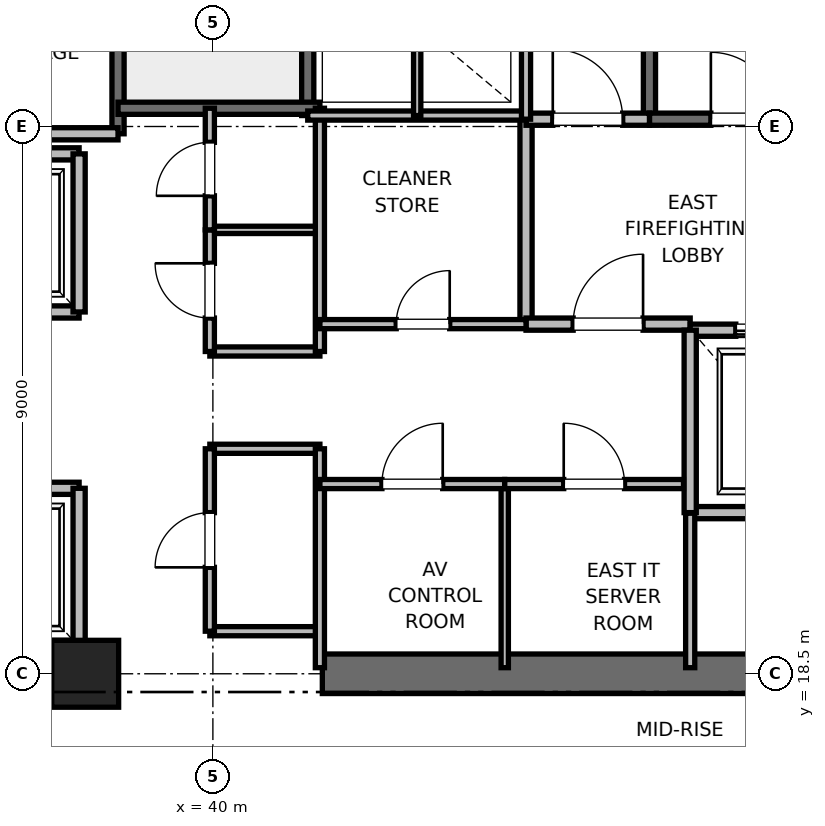
"""IFC4 building model, lengths in metres.
Left out: names, types, materials, properties, quantities, classifications, styles, units other than length and angle.
Written with IfcOpenShell. Run it as: python <this file> out.ifc"""

import sys

from ifc_helpers import new_model, si_unit, direction, frame, frame_2d, origin, origin_2d, place, context, subcontext, project, spatial, rectangle, extrude, element, fill, save


model = new_model("IFC4")
c1 = context("Model", 3, precision=1e-05, world=origin(), true_north=direction((0.0, 1.0)))
c2 = subcontext(c1, "Body", "Model", "MODEL_VIEW")
j1 = project(units=[si_unit("LENGTHUNIT", "METRE"), si_unit("PLANEANGLEUNIT", "RADIAN")], contexts=[c1])
p1 = place(None, origin())
s1 = spatial("IfcSite", under=j1, at=p1, CompositionType="ELEMENT")
p2 = place(p1, origin())
s2 = spatial("IfcBuilding", under=s1, at=p2, CompositionType="ELEMENT")
p3 = place(p2, frame((0.0, 0.0, 71.6)))
s3 = spatial("IfcBuildingStorey", under=s2, at=p3, CompositionType="ELEMENT", Elevation=71.6)
p4 = place(p3, frame((37.9, 18.5, 0.0), z_axis=(0.0, 0.0, 1.0), x_axis=(1.0, 0.0, 0.0)))
e1 = element("IfcColumn", 1, at=p4, inside=s3, PredefinedType="PILASTER", context=c2, shape_type="SweptSolid", body=[
    extrude(rectangle(XDim=1.1, YDim=1.1, at=origin_2d()), origin(), (0.0, 0.0, 1.0), 4.0),
])
for number, where, z_axis, x_axis in (
    (2, (29.0, 18.5, 0.0), (0.0, 0.0, 1.0), (1.0, 0.0, 0.0)),
    (3, (41.8, 18.5, 0.0), (0.0, 0.0, 1.0), (1.0, 0.0, 0.0)),
):
    element("IfcWall", number, at=place(p3, frame(where, z_axis=z_axis, x_axis=x_axis)), inside=s3, PredefinedType="SHEAR", context=c2, shape_type="SweptSolid", body=[
        extrude(rectangle(XDim=9.2, YDim=0.65, at=frame_2d((4.6, 0.0))), origin(), (0.0, 0.0, 1.0), 3.76),
    ])
p5 = place(p3, frame((47.18, 27.62, 0.0), z_axis=(0.0, 0.0, 1.0), x_axis=(0.0, 1.0, 0.0)))
e4 = element("IfcWall", 4, at=p5, inside=s3, PredefinedType="SOLIDWALL", context=c2, shape_type="SweptSolid", body=[
    extrude(rectangle(XDim=8.18, YDim=0.2, at=frame_2d((4.09, 0.0))), origin(), (0.0, 0.0, 1.0), 3.76),
])
p6 = place(p3, frame((47.18, 27.62, 0.0), z_axis=(0.0, 0.0, 1.0), x_axis=(1.0, 0.0, 0.0)))
e5 = element("IfcWall", 5, at=p6, inside=s3, PredefinedType="SOLIDWALL", context=c2, shape_type="SweptSolid", body=[
    extrude(rectangle(XDim=3.12, YDim=0.2, at=frame_2d((1.56, 0.0))), origin(), (0.0, 0.0, 1.0), 3.76),
])
p7 = place(p6, frame((1.01, 0.0, 0.0)))
e6 = element("IfcOpeningElement", 6, at=p7, cuts=e5, PredefinedType="OPENING", context=c2, shape_type="SweptSolid", body=[
    extrude(rectangle(XDim=1.1, YDim=2.15, at=frame_2d((0.55, 1.075))), frame((0.0, 0.1, 0.0), z_axis=(0.0, -1.0, 0.0), x_axis=(1.0, 0.0, 0.0)), (0.0, 0.0, 1.0), 0.2),
])
p8 = place(p3, frame((38.44, 27.38, 0.0), z_axis=(0.0, 0.0, 1.0), x_axis=(0.0, 1.0, 0.0)))
e7 = element("IfcWall", 7, at=p8, inside=s3, PredefinedType="SOLIDWALL", context=c2, shape_type="SweptSolid", body=[
    extrude(rectangle(XDim=8.87, YDim=0.2, at=frame_2d((4.435, 0.0))), origin(), (0.0, 0.0, 1.0), 3.76),
])
p9 = place(p3, frame((41.56, 27.68, 0.0), z_axis=(0.0, 0.0, 1.0), x_axis=(0.0, 1.0, 0.0)))
e8 = element("IfcWall", 8, at=p9, inside=s3, PredefinedType="SOLIDWALL", context=c2, shape_type="SweptSolid", body=[
    extrude(rectangle(XDim=8.57, YDim=0.2, at=frame_2d((4.285, 0.0))), origin(), (0.0, 0.0, 1.0), 3.76),
])
p10 = place(p3, frame((38.44, 27.8, 0.0), z_axis=(0.0, 0.0, 1.0), x_axis=(1.0, 0.0, 0.0)))
e9 = element("IfcWall", 9, at=p10, inside=s3, PredefinedType="SOLIDWALL", context=c2, shape_type="SweptSolid", body=[
    extrude(rectangle(XDim=3.32, YDim=0.2, at=frame_2d((1.66, 0.0))), origin(), (0.0, 0.0, 1.0), 3.76),
])
p11 = place(p3, frame((32.82, 27.38, 0.0), z_axis=(0.0, 0.0, 1.0), x_axis=(1.0, 0.0, 0.0)))
e10 = element("IfcWall", 10, at=p11, inside=s3, PredefinedType="PARTITIONING", context=c2, shape_type="SweptSolid", body=[
    extrude(rectangle(XDim=5.62, YDim=0.2, at=frame_2d((2.81, 0.0))), origin(), (0.0, 0.0, 1.0), 3.76),
])
p12 = place(p3, frame((45.15, 24.25, 0.0), z_axis=(0.0, 0.0, 1.0), x_axis=(0.0, 1.0, 0.0)))
e11 = element("IfcWall", 11, at=p12, inside=s3, PredefinedType="PARTITIONING", context=c2, shape_type="SweptSolid", body=[
    extrude(rectangle(XDim=3.37, YDim=0.2, at=frame_2d((1.685, 0.0))), origin(), (0.0, 0.0, 1.0), 3.76),
])
p13 = place(p3, frame((45.15, 24.25, 0.0), z_axis=(0.0, 0.0, 1.0), x_axis=(1.0, 0.0, 0.0)))
e12 = element("IfcWall", 12, at=p13, inside=s3, PredefinedType="PARTITIONING", context=c2, shape_type="SweptSolid", body=[
    extrude(rectangle(XDim=2.7, YDim=0.2, at=frame_2d((1.35, 0.0))), origin(), (0.0, 0.0, 1.0), 3.76),
])
p14 = place(p13, frame((0.775, 0.0, 0.0)))
e13 = element("IfcOpeningElement", 13, at=p14, cuts=e12, PredefinedType="OPENING", context=c2, shape_type="SweptSolid", body=[
    extrude(rectangle(XDim=1.15, YDim=2.2, at=frame_2d((0.575, 1.1))), frame((0.0, 0.1, 0.0), z_axis=(0.0, -1.0, 0.0), x_axis=(1.0, 0.0, 0.0)), (0.0, 0.0, 1.0), 0.2),
])
p15 = place(p3, frame((45.15, 27.62, 0.0), z_axis=(0.0, 0.0, 1.0), x_axis=(1.0, 0.0, 0.0)))
e14 = element("IfcWall", 14, at=p15, inside=s3, PredefinedType="PARTITIONING", context=c2, shape_type="SweptSolid", body=[
    extrude(rectangle(XDim=2.03, YDim=0.2, at=frame_2d((1.015, 0.0))), origin(), (0.0, 0.0, 1.0), 3.76),
])
p16 = place(p15, frame((0.44, 0.0, 0.0)))
e15 = element("IfcOpeningElement", 15, at=p16, cuts=e14, PredefinedType="OPENING", context=c2, shape_type="SweptSolid", body=[
    extrude(rectangle(XDim=1.15, YDim=2.2, at=frame_2d((0.575, 1.1))), frame((0.0, 0.1, 0.0), z_axis=(0.0, -1.0, 0.0), x_axis=(1.0, 0.0, 0.0)), (0.0, 0.0, 1.0), 0.2),
])
p17 = place(p3, frame((47.85, 21.15, 0.0), z_axis=(0.0, 0.0, 1.0), x_axis=(1.0, 0.0, 0.0)))
e16 = element("IfcWall", 16, at=p17, inside=s3, PredefinedType="SOLIDWALL", context=c2, shape_type="SweptSolid", body=[
    extrude(rectangle(XDim=2.6, YDim=0.2, at=frame_2d((1.3, 0.0))), origin(), (0.0, 0.0, 1.0), 3.76),
])
p18 = place(p3, frame((50.45, 24.15, 0.0), z_axis=(0.0, 0.0, 1.0), x_axis=(-1.0, 0.0, 0.0)))
e17 = element("IfcWall", 17, at=p18, inside=s3, PredefinedType="SOLIDWALL", context=c2, shape_type="SweptSolid", body=[
    extrude(rectangle(XDim=2.6, YDim=0.2, at=frame_2d((1.3, 0.0))), origin(), (0.0, 0.0, 1.0), 2.54),
])
p19 = place(p18, frame((0.75, 0.0, 0.0)))
e18 = element("IfcOpeningElement", 18, at=p19, cuts=e17, PredefinedType="OPENING", context=c2, shape_type="SweptSolid", body=[
    extrude(rectangle(XDim=1.1, YDim=2.2, at=frame_2d((0.55, 1.1))), frame((0.0, 0.1, 0.0), z_axis=(0.0, -1.0, 0.0), x_axis=(1.0, 0.0, 0.0)), (0.0, 0.0, 1.0), 0.2),
])
p20 = place(p3, frame((47.85, 24.15, 0.0), z_axis=(0.0, 0.0, 1.0), x_axis=(0.0, -1.0, 0.0)))
e19 = element("IfcWall", 19, at=p20, inside=s3, PredefinedType="SOLIDWALL", context=c2, shape_type="SweptSolid", body=[
    extrude(rectangle(XDim=3.0, YDim=0.2, at=frame_2d((1.5, 0.0))), origin(), (0.0, 0.0, 1.0), 3.76),
])
p21 = place(p3, frame((35.5, 18.95, 0.0), z_axis=(0.0, 0.0, 1.0), x_axis=(1.0, 0.0, 0.0)))
e20 = element("IfcWall", 20, at=p21, inside=s3, PredefinedType="SOLIDWALL", context=c2, shape_type="SweptSolid", body=[
    extrude(rectangle(XDim=2.3, YDim=0.2, at=frame_2d((1.15, 0.0))), origin(), (0.0, 0.0, 1.0), 2.54),
])
p22 = place(p3, frame((37.8, 21.55, 0.0), z_axis=(0.0, 0.0, 1.0), x_axis=(-1.0, 0.0, 0.0)))
e21 = element("IfcWall", 21, at=p22, inside=s3, PredefinedType="SOLIDWALL", context=c2, shape_type="SweptSolid", body=[
    extrude(rectangle(XDim=2.3, YDim=0.2, at=frame_2d((1.15, 0.0))), origin(), (0.0, 0.0, 1.0), 3.76),
])
p23 = place(p22, frame((0.6, 0.0, 0.0)))
e22 = element("IfcOpeningElement", 22, at=p23, cuts=e21, PredefinedType="OPENING", context=c2, shape_type="SweptSolid", body=[
    extrude(rectangle(XDim=1.1, YDim=2.2, at=frame_2d((0.55, 1.1))), frame((0.0, 0.1, 0.0), z_axis=(0.0, -1.0, 0.0), x_axis=(1.0, 0.0, 0.0)), (0.0, 0.0, 1.0), 0.2),
])
p24 = place(p3, frame((37.8, 18.95, 0.0), z_axis=(0.0, 0.0, 1.0), x_axis=(0.0, 1.0, 0.0)))
e23 = element("IfcWall", 23, at=p24, inside=s3, PredefinedType="SOLIDWALL", context=c2, shape_type="SweptSolid", body=[
    extrude(rectangle(XDim=2.6, YDim=0.2, at=frame_2d((1.3, 0.0))), origin(), (0.0, 0.0, 1.0), 2.54),
])
p25 = place(p3, frame((35.5, 24.45, 0.0), z_axis=(0.0, 0.0, 1.0), x_axis=(1.0, 0.0, 0.0)))
e24 = element("IfcWall", 24, at=p25, inside=s3, PredefinedType="SOLIDWALL", context=c2, shape_type="SweptSolid", body=[
    extrude(rectangle(XDim=2.3, YDim=0.2, at=frame_2d((1.15, 0.0))), origin(), (0.0, 0.0, 1.0), 3.76),
])
p26 = place(p25, frame((0.6, 0.0, 0.0)))
e25 = element("IfcOpeningElement", 25, at=p26, cuts=e24, PredefinedType="OPENING", context=c2, shape_type="SweptSolid", body=[
    extrude(rectangle(XDim=1.1, YDim=2.2, at=frame_2d((0.55, 1.1))), frame((0.0, 0.1, 0.0), z_axis=(0.0, -1.0, 0.0), x_axis=(1.0, 0.0, 0.0)), (0.0, 0.0, 1.0), 0.2),
])
p27 = place(p3, frame((37.8, 27.05, 0.0), z_axis=(0.0, 0.0, 1.0), x_axis=(-1.0, 0.0, 0.0)))
e26 = element("IfcWall", 26, at=p27, inside=s3, PredefinedType="SOLIDWALL", context=c2, shape_type="SweptSolid", body=[
    extrude(rectangle(XDim=2.3, YDim=0.2, at=frame_2d((1.15, 0.0))), origin(), (0.0, 0.0, 1.0), 3.76),
])
p28 = place(p3, frame((37.8, 24.45, 0.0), z_axis=(0.0, 0.0, 1.0), x_axis=(0.0, 1.0, 0.0)))
e27 = element("IfcWall", 27, at=p28, inside=s3, PredefinedType="SOLIDWALL", context=c2, shape_type="SweptSolid", body=[
    extrude(rectangle(XDim=2.6, YDim=0.2, at=frame_2d((1.3, 0.0))), origin(), (0.0, 0.0, 1.0), 3.76),
])
for number, where, z_axis, x_axis in (
    (28, (39.95, 19.2, 0.0), (0.0, 0.0, 1.0), (1.0, 0.0, 0.0)),
    (29, (39.95, 22.2, 0.0), (0.0, 0.0, 1.0), (1.0, 0.0, 0.0)),
    (30, (39.95, 23.8, 0.0), (0.0, 0.0, 1.0), (1.0, 0.0, 0.0)),
):
    element("IfcWall", number, at=place(p3, frame(where, z_axis=z_axis, x_axis=x_axis)), inside=s3, PredefinedType="PARTITIONING", context=c2, shape_type="SweptSolid", body=[
        extrude(rectangle(XDim=1.81, YDim=0.15, at=frame_2d((0.905, 0.0))), origin(), (0.0, 0.0, 1.0), 2.85),
    ])
p29 = place(p3, frame((39.95, 25.8, 0.0), z_axis=(0.0, 0.0, 1.0), x_axis=(1.0, 0.0, 0.0)))
e31 = element("IfcWall", 31, at=p29, inside=s3, PredefinedType="PARTITIONING", context=c2, shape_type="SweptSolid", body=[
    extrude(rectangle(XDim=1.81, YDim=0.12, at=frame_2d((0.905, 0.0))), origin(), (0.0, 0.0, 1.0), 2.85),
])
p30 = place(p3, frame((41.76, 18.6, 0.0), z_axis=(0.0, 0.0, 1.0), x_axis=(0.0, 1.0, 0.0)))
e32 = element("IfcWall", 32, at=p30, inside=s3, PredefinedType="PARTITIONING", context=c2, shape_type="SweptSolid", body=[
    extrude(rectangle(XDim=3.6, YDim=0.15, at=frame_2d((1.8, 0.0))), origin(), (0.0, 0.0, 1.0), 2.54),
])
p31 = place(p3, frame((41.76, 23.8, 0.0), z_axis=(0.0, 0.0, 1.0), x_axis=(0.0, 1.0, 0.0)))
e33 = element("IfcWall", 33, at=p31, inside=s3, PredefinedType="PARTITIONING", context=c2, shape_type="SweptSolid", body=[
    extrude(rectangle(XDim=4.0, YDim=0.15, at=frame_2d((2.0, 0.0))), origin(), (0.0, 0.0, 1.0), 2.85),
])
p32 = place(p3, frame((39.95, 19.2, 0.0), z_axis=(0.0, 0.0, 1.0), x_axis=(0.0, 1.0, 0.0)))
e34 = element("IfcWall", 34, at=p32, inside=s3, PredefinedType="PARTITIONING", context=c2, shape_type="SweptSolid", body=[
    extrude(rectangle(XDim=3.0, YDim=0.15, at=frame_2d((1.5, 0.0))), origin(), (0.0, 0.0, 1.0), 2.85),
])
p33 = place(p32, frame((1.05, 0.0, 0.0)))
e35 = element("IfcOpeningElement", 35, at=p33, cuts=e34, PredefinedType="OPENING", context=c2, shape_type="SweptSolid", body=[
    extrude(rectangle(XDim=0.9, YDim=2.1, at=frame_2d((0.45, 1.05))), frame((0.0, 0.075, 0.0), z_axis=(0.0, -1.0, 0.0), x_axis=(1.0, 0.0, 0.0)), (0.0, 0.0, 1.0), 0.15),
])
p34 = place(p3, frame((39.95, 23.8, 0.0), z_axis=(0.0, 0.0, 1.0), x_axis=(0.0, 1.0, 0.0)))
e36 = element("IfcWall", 36, at=p34, inside=s3, PredefinedType="PARTITIONING", context=c2, shape_type="SweptSolid", body=[
    extrude(rectangle(XDim=2.0, YDim=0.15, at=frame_2d((1.0, 0.0))), origin(), (0.0, 0.0, 1.0), 2.85),
])
p35 = place(p34, frame((0.55, 0.0, 0.0)))
e37 = element("IfcOpeningElement", 37, at=p35, cuts=e36, PredefinedType="OPENING", context=c2, shape_type="SweptSolid", body=[
    extrude(rectangle(XDim=0.9, YDim=2.1, at=frame_2d((0.45, 1.05))), frame((0.0, 0.075, 0.0), z_axis=(0.0, -1.0, 0.0), x_axis=(1.0, 0.0, 0.0)), (0.0, 0.0, 1.0), 0.15),
])
p36 = place(p3, frame((39.95, 25.8, 0.0), z_axis=(0.0, 0.0, 1.0), x_axis=(0.0, 1.0, 0.0)))
e38 = element("IfcWall", 38, at=p36, inside=s3, PredefinedType="PARTITIONING", context=c2, shape_type="SweptSolid", body=[
    extrude(rectangle(XDim=2.0, YDim=0.15, at=frame_2d((1.0, 0.0))), origin(), (0.0, 0.0, 1.0), 2.85),
])
p37 = place(p36, frame((0.56, 0.0, 0.0)))
e39 = element("IfcOpeningElement", 39, at=p37, cuts=e38, PredefinedType="OPENING", context=c2, shape_type="SweptSolid", body=[
    extrude(rectangle(XDim=0.88, YDim=2.1, at=frame_2d((0.44, 1.05))), frame((0.0, 0.075, 0.0), z_axis=(0.0, -1.0, 0.0), x_axis=(1.0, 0.0, 0.0)), (0.0, 0.0, 1.0), 0.15),
])
p38 = place(p3, frame((41.56, 27.68, 0.0), z_axis=(0.0, 0.0, 1.0), x_axis=(1.0, 0.0, 0.0)))
e40 = element("IfcWall", 40, at=p38, inside=s3, PredefinedType="PARTITIONING", context=c2, shape_type="SweptSolid", body=[
    extrude(rectangle(XDim=3.59, YDim=0.15, at=frame_2d((1.795, 0.0))), origin(), (0.0, 0.0, 1.0), 2.85),
])
p39 = place(p3, frame((47.85, 18.6, 0.0), z_axis=(0.0, 0.0, 1.0), x_axis=(0.0, 1.0, 0.0)))
e41 = element("IfcWall", 41, at=p39, inside=s3, PredefinedType="PARTITIONING", context=c2, shape_type="SweptSolid", body=[
    extrude(rectangle(XDim=2.54, YDim=0.15, at=frame_2d((1.27, 0.0))), origin(), (0.0, 0.0, 1.0), 2.85),
])
p40 = place(p3, frame((44.8, 18.6, 0.0), z_axis=(0.0, 0.0, 1.0), x_axis=(0.0, 1.0, 0.0)))
e42 = element("IfcWall", 42, at=p40, inside=s3, PredefinedType="PARTITIONING", context=c2, shape_type="SweptSolid", body=[
    extrude(rectangle(XDim=3.02, YDim=0.12, at=frame_2d((1.51, 0.0))), origin(), (0.0, 0.0, 1.0), 2.85),
])
p41 = place(p3, frame((41.76, 21.62, 0.0), z_axis=(0.0, 0.0, 1.0), x_axis=(1.0, 0.0, 0.0)))
e43 = element("IfcWall", 43, at=p41, inside=s3, PredefinedType="PARTITIONING", context=c2, shape_type="SweptSolid", body=[
    extrude(rectangle(XDim=3.04, YDim=0.15, at=frame_2d((1.52, 0.0))), origin(), (0.0, 0.0, 1.0), 2.85),
])
p42 = place(p41, frame((1.02, 0.0, 0.0)))
e44 = element("IfcOpeningElement", 44, at=p42, cuts=e43, PredefinedType="OPENING", context=c2, shape_type="SweptSolid", body=[
    extrude(rectangle(XDim=1.0, YDim=2.15, at=frame_2d((0.5, 1.075))), frame((0.0, 0.075, 0.0), z_axis=(0.0, -1.0, 0.0), x_axis=(1.0, 0.0, 0.0)), (0.0, 0.0, 1.0), 0.15),
])
p43 = place(p3, frame((44.8, 21.62, 0.0), z_axis=(0.0, 0.0, 1.0), x_axis=(1.0, 0.0, 0.0)))
e45 = element("IfcWall", 45, at=p43, inside=s3, PredefinedType="PARTITIONING", context=c2, shape_type="SweptSolid", body=[
    extrude(rectangle(XDim=2.94, YDim=0.15, at=frame_2d((1.47, 0.0))), origin(), (0.0, 0.0, 1.0), 2.85),
])
p44 = place(p43, frame((0.97, 0.0, 0.0)))
e46 = element("IfcOpeningElement", 46, at=p44, cuts=e45, PredefinedType="OPENING", context=c2, shape_type="SweptSolid", body=[
    extrude(rectangle(XDim=1.0, YDim=2.15, at=frame_2d((0.5, 1.075))), frame((0.0, 0.075, 0.0), z_axis=(0.0, -1.0, 0.0), x_axis=(1.0, 0.0, 0.0)), (0.0, 0.0, 1.0), 0.15),
])
p45 = place(p3, frame((41.76, 24.25, 0.0), z_axis=(0.0, 0.0, 1.0), x_axis=(1.0, 0.0, 0.0)))
e47 = element("IfcWall", 47, at=p45, inside=s3, PredefinedType="PARTITIONING", context=c2, shape_type="SweptSolid", body=[
    extrude(rectangle(XDim=3.39, YDim=0.15, at=frame_2d((1.695, 0.0))), origin(), (0.0, 0.0, 1.0), 2.85),
])
p46 = place(p45, frame((1.255, 0.0, 0.0)))
e48 = element("IfcOpeningElement", 48, at=p46, cuts=e47, PredefinedType="OPENING", context=c2, shape_type="SweptSolid", body=[
    extrude(rectangle(XDim=0.88, YDim=2.1, at=frame_2d((0.44, 1.05))), frame((0.0, 0.075, 0.0), z_axis=(0.0, -1.0, 0.0), x_axis=(1.0, 0.0, 0.0)), (0.0, 0.0, 1.0), 0.15),
])
p47 = place(p3, frame((45.15, 27.62, 0.0), z_axis=(0.0, 0.0, 1.0), x_axis=(0.0, 1.0, 0.0)))
e49 = element("IfcWall", 49, at=p47, inside=s3, PredefinedType="PARTITIONING", context=c2, shape_type="SweptSolid", body=[
    extrude(rectangle(XDim=3.1, YDim=0.15, at=frame_2d((1.55, 0.0))), origin(), (0.0, 0.0, 1.0), 2.85),
])
p48 = place(p3, frame((43.36, 27.68, 0.0), z_axis=(0.0, 0.0, 1.0), x_axis=(0.0, 1.0, 0.0)))
e50 = element("IfcWall", 50, at=p48, inside=s3, PredefinedType="PARTITIONING", context=c2, shape_type="SweptSolid", body=[
    extrude(rectangle(XDim=3.04, YDim=0.12, at=frame_2d((1.52, 0.0))), origin(), (0.0, 0.0, 1.0), 2.85),
])
p49 = place(p7, origin())
e51 = element("IfcDoor", 51, at=p49, inside=s3, OperationType="SINGLE_SWING_LEFT", PredefinedType="DOOR", context=c2, shape_type="SweptSolid", body=[
    extrude(rectangle(XDim=1.1, YDim=2.15, at=frame_2d((0.55, 1.075))), frame((0.0, 0.025, 0.0), z_axis=(0.0, -1.0, 0.0), x_axis=(1.0, 0.0, 0.0)), (0.0, 0.0, 1.0), 0.05),
])
fill(e6, e51)
p50 = place(p14, origin())
e52 = element("IfcDoor", 52, at=p50, inside=s3, OperationType="SINGLE_SWING_RIGHT", PredefinedType="DOOR", context=c2, shape_type="SweptSolid", body=[
    extrude(rectangle(XDim=1.15, YDim=2.2, at=frame_2d((0.575, 1.1))), frame((0.0, 0.025, 0.0), z_axis=(0.0, -1.0, 0.0), x_axis=(1.0, 0.0, 0.0)), (0.0, 0.0, 1.0), 0.05),
])
fill(e13, e52)
p51 = place(p16, origin())
e53 = element("IfcDoor", 53, at=p51, inside=s3, OperationType="SINGLE_SWING_LEFT", PredefinedType="DOOR", context=c2, shape_type="SweptSolid", body=[
    extrude(rectangle(XDim=1.15, YDim=2.2, at=frame_2d((0.575, 1.1))), frame((0.0, 0.025, 0.0), z_axis=(0.0, -1.0, 0.0), x_axis=(1.0, 0.0, 0.0)), (0.0, 0.0, 1.0), 0.05),
])
fill(e15, e53)
p52 = place(p19, origin())
e54 = element("IfcDoor", 54, at=p52, inside=s3, OperationType="SLIDING_TO_RIGHT", PredefinedType="DOOR", context=c2, shape_type="SweptSolid", body=[
    extrude(rectangle(XDim=1.1, YDim=2.2, at=frame_2d((0.55, 1.1))), frame((0.0, 0.025, 0.0), z_axis=(0.0, -1.0, 0.0), x_axis=(1.0, 0.0, 0.0)), (0.0, 0.0, 1.0), 0.05),
])
fill(e18, e54)
p53 = place(p33, origin())
e55 = element("IfcDoor", 55, at=p53, inside=s3, OperationType="SINGLE_SWING_LEFT", PredefinedType="DOOR", context=c2, shape_type="SweptSolid", body=[
    extrude(rectangle(XDim=0.9, YDim=2.1, at=frame_2d((0.45, 1.05))), frame((0.0, 0.025, 0.0), z_axis=(0.0, -1.0, 0.0), x_axis=(1.0, 0.0, 0.0)), (0.0, 0.0, 1.0), 0.05),
])
fill(e35, e55)
p54 = place(p35, origin())
e56 = element("IfcDoor", 56, at=p54, inside=s3, OperationType="SINGLE_SWING_RIGHT", PredefinedType="DOOR", context=c2, shape_type="SweptSolid", body=[
    extrude(rectangle(XDim=0.9, YDim=2.1, at=frame_2d((0.45, 1.05))), frame((0.0, 0.025, 0.0), z_axis=(0.0, -1.0, 0.0), x_axis=(1.0, 0.0, 0.0)), (0.0, 0.0, 1.0), 0.05),
])
fill(e37, e56)
p55 = place(p37, origin())
e57 = element("IfcDoor", 57, at=p55, inside=s3, OperationType="SINGLE_SWING_LEFT", PredefinedType="DOOR", context=c2, shape_type="SweptSolid", body=[
    extrude(rectangle(XDim=0.88, YDim=2.1, at=frame_2d((0.44, 1.05))), frame((0.0, 0.025, 0.0), z_axis=(0.0, -1.0, 0.0), x_axis=(1.0, 0.0, 0.0)), (0.0, 0.0, 1.0), 0.05),
])
fill(e39, e57)
p56 = place(p42, origin())
e58 = element("IfcDoor", 58, at=p56, inside=s3, OperationType="SINGLE_SWING_RIGHT", PredefinedType="DOOR", context=c2, shape_type="SweptSolid", body=[
    extrude(rectangle(XDim=1.0, YDim=2.15, at=frame_2d((0.5, 1.075))), frame((0.0, 0.025, 0.0), z_axis=(0.0, -1.0, 0.0), x_axis=(1.0, 0.0, 0.0)), (0.0, 0.0, 1.0), 0.05),
])
fill(e44, e58)
p57 = place(p44, origin())
e59 = element("IfcDoor", 59, at=p57, inside=s3, OperationType="SINGLE_SWING_LEFT", PredefinedType="DOOR", context=c2, shape_type="SweptSolid", body=[
    extrude(rectangle(XDim=1.0, YDim=2.15, at=frame_2d((0.5, 1.075))), frame((0.0, 0.025, 0.0), z_axis=(0.0, -1.0, 0.0), x_axis=(1.0, 0.0, 0.0)), (0.0, 0.0, 1.0), 0.05),
])
fill(e46, e59)
p58 = place(p46, origin())
e60 = element("IfcDoor", 60, at=p58, inside=s3, OperationType="SINGLE_SWING_RIGHT", PredefinedType="DOOR", context=c2, shape_type="SweptSolid", body=[
    extrude(rectangle(XDim=0.88, YDim=2.1, at=frame_2d((0.44, 1.05))), frame((0.0, 0.025, 0.0), z_axis=(0.0, -1.0, 0.0), x_axis=(1.0, 0.0, 0.0)), (0.0, 0.0, 1.0), 0.05),
])
fill(e48, e60)
save(model, sys.argv[1])
